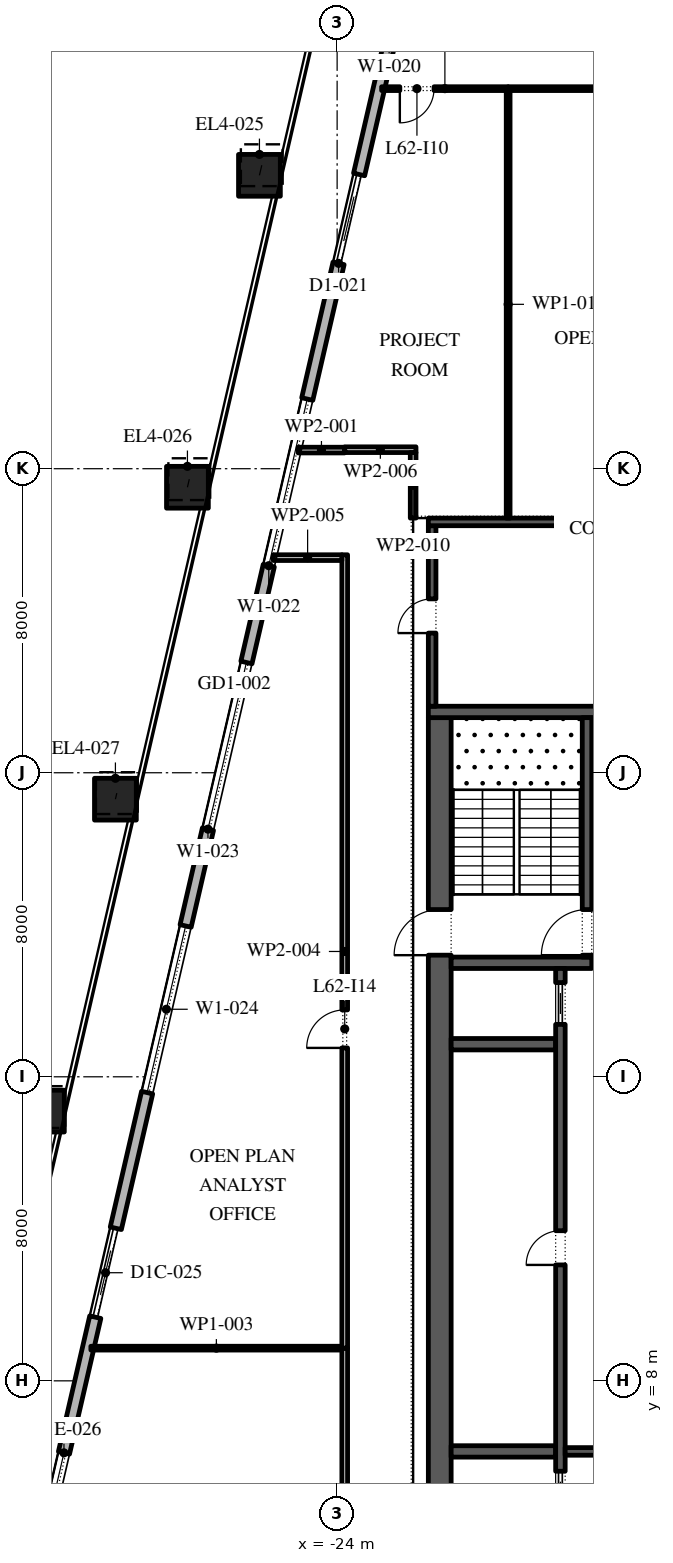
"""IFC4 building model, lengths in metres.
Left out: names, types, materials, properties, quantities, classifications, styles, units other than length and angle.
Written with IfcOpenShell. Run it as: python <this file> out.ifc"""

import sys

from ifc_helpers import new_model, si_unit, direction, frame, frame_2d, origin, origin_2d, place, context, subcontext, project, spatial, rectangle, extrude, element, fill, save


model = new_model("IFC4")
c1 = context("Model", 3, precision=1e-05, world=origin(), true_north=direction((0.0, 1.0)))
c2 = subcontext(c1, "Body", "Model", "MODEL_VIEW")
j1 = project(units=[si_unit("LENGTHUNIT", "METRE"), si_unit("PLANEANGLEUNIT", "RADIAN")], contexts=[c1])
p1 = place(None, origin())
s1 = spatial("IfcSite", under=j1, at=p1, CompositionType="ELEMENT")
p2 = place(p1, origin())
s2 = spatial("IfcBuilding", under=s1, at=p2, CompositionType="ELEMENT")
p3 = place(p2, frame((0.0, 0.0, 285.0)))
s3 = spatial("IfcBuildingStorey", under=s2, at=p3, CompositionType="ELEMENT", Elevation=285.0)
p4 = place(p3, frame((-26.044, 39.719, 0.0), z_axis=(0.014559841898, 0.063111984005, 0.997900239743), x_axis=(-0.97440628778, 0.224794097641, 0.0)))
e1 = element("IfcColumn", 1, at=p4, inside=s3, PredefinedType="COLUMN", context=c2, shape_type="SweptSolid", body=[
    extrude(rectangle(XDim=1.1, YDim=1.1, at=origin_2d()), origin(), (0.0, 0.0, 1.0), 4.209),
])
p5 = place(p3, frame((-27.939, 31.512, 0.0), z_axis=(0.011668267153, 0.050562490995, 0.998652735462), x_axis=(-0.974391195695, 0.224859506699, 0.0)))
e2 = element("IfcColumn", 2, at=p5, inside=s3, PredefinedType="COLUMN", context=c2, shape_type="SweptSolid", body=[
    extrude(rectangle(XDim=1.1, YDim=1.1, at=origin_2d()), origin(), (0.0, 0.0, 1.0), 4.206),
])
p6 = place(p3, frame((-29.834, 23.304, 0.0), z_axis=(0.008770884695, 0.037929719907, 0.99924191662), x_axis=(-0.974290512438, 0.225295355862, 0.0)))
e3 = element("IfcColumn", 3, at=p6, inside=s3, PredefinedType="COLUMN", context=c2, shape_type="SweptSolid", body=[
    extrude(rectangle(XDim=1.1, YDim=1.1, at=origin_2d()), origin(), (0.0, 0.0, 1.0), 4.203),
])
p7 = place(p3, frame((-31.729, 15.097, 0.0), z_axis=(0.005869091843, 0.025277771797, 0.999663237302), x_axis=(-0.974088391429, 0.226167649504, 0.0)))
e4 = element("IfcColumn", 4, at=p7, inside=s3, PredefinedType="COLUMN", context=c2, shape_type="SweptSolid", body=[
    extrude(rectangle(XDim=1.1, YDim=1.1, at=origin_2d()), origin(), (0.0, 0.0, 1.0), 4.201),
])
p8 = place(p3, frame((-21.359, 48.678, 0.0), z_axis=(0.0, 0.0, 1.0), x_axis=(-0.224949198343, -0.974370493275, 0.0)))
e5 = element("IfcWall", 5, at=p8, inside=s3, PredefinedType="STANDARD", context=c2, shape_type="SweptSolid", body=[
    extrude(rectangle(XDim=49.5, YDim=0.3, at=frame_2d((24.75, 0.0))), origin(), (0.0, 0.0, 1.0), 4.0),
])
p9 = place(p8, frame((1.157, 0.0, 0.45)))
e6 = element("IfcOpeningElement", 6, at=p9, cuts=e5, PredefinedType="OPENING", context=c2, shape_type="SweptSolid", body=[
    extrude(rectangle(XDim=4.5, YDim=3.05, at=frame_2d((2.25, 1.525))), frame((0.0, 0.16, 0.0), z_axis=(0.0, -1.0, 0.0), x_axis=(1.0, 0.0, 0.0)), (0.0, 0.0, 1.0), 0.32),
])
p10 = place(p8, frame((9.171, 0.0, 0.0)))
e7 = element("IfcOpeningElement", 7, at=p10, cuts=e5, PredefinedType="OPENING", context=c2, shape_type="SweptSolid", body=[
    extrude(rectangle(XDim=2.4, YDim=3.5, at=frame_2d((1.2, 1.75))), frame((0.0, 0.16, 0.0), z_axis=(0.0, -1.0, 0.0), x_axis=(1.0, 0.0, 0.0)), (0.0, 0.0, 1.0), 0.32),
])
p11 = place(p8, frame((15.236, 0.0, 0.45)))
e8 = element("IfcOpeningElement", 8, at=p11, cuts=e5, PredefinedType="OPENING", context=c2, shape_type="SweptSolid", body=[
    extrude(rectangle(XDim=4.5, YDim=3.05, at=frame_2d((2.25, 1.525))), frame((0.0, 0.16, 0.0), z_axis=(0.0, -1.0, 0.0), x_axis=(1.0, 0.0, 0.0)), (0.0, 0.0, 1.0), 0.32),
])
p12 = place(p8, frame((22.35, 0.0, 0.45)))
e9 = element("IfcOpeningElement", 9, at=p12, cuts=e5, PredefinedType="OPENING", context=c2, shape_type="SweptSolid", body=[
    extrude(rectangle(XDim=4.5, YDim=3.05, at=frame_2d((2.25, 1.525))), frame((0.0, 0.16, 0.0), z_axis=(0.0, -1.0, 0.0), x_axis=(1.0, 0.0, 0.0)), (0.0, 0.0, 1.0), 0.32),
])
p13 = place(p8, frame((29.464, 0.0, 0.45)))
e10 = element("IfcOpeningElement", 10, at=p13, cuts=e5, PredefinedType="OPENING", context=c2, shape_type="SweptSolid", body=[
    extrude(rectangle(XDim=4.5, YDim=3.05, at=frame_2d((2.25, 1.525))), frame((0.0, 0.16, 0.0), z_axis=(0.0, -1.0, 0.0), x_axis=(1.0, 0.0, 0.0)), (0.0, 0.0, 1.0), 0.32),
])
p14 = place(p8, frame((37.628, 0.0, 0.0)))
e11 = element("IfcOpeningElement", 11, at=p14, cuts=e5, PredefinedType="OPENING", context=c2, shape_type="SweptSolid", body=[
    extrude(rectangle(XDim=2.4, YDim=3.325, at=frame_2d((1.2, 1.663))), frame((0.0, 0.16, 0.0), z_axis=(0.0, -1.0, 0.0), x_axis=(1.0, 0.0, 0.0)), (0.0, 0.0, 1.0), 0.32),
])
p15 = place(p8, frame((43.693, 0.0, 0.45)))
e12 = element("IfcOpeningElement", 12, at=p15, cuts=e5, PredefinedType="OPENING", context=c2, shape_type="SweptSolid", body=[
    extrude(rectangle(XDim=4.5, YDim=2.825, at=frame_2d((2.25, 1.413))), frame((0.0, 0.16, 0.0), z_axis=(0.0, -1.0, 0.0), x_axis=(1.0, 0.0, 0.0)), (0.0, 0.0, 1.0), 0.32),
])
p16 = place(p3, frame((-21.3, -2.45, 0.0), z_axis=(0.0, 0.0, 1.0), x_axis=(0.0, 1.0, 0.0)))
e13 = element("IfcWall", 13, at=p16, inside=s3, PredefinedType="SHEAR", context=c2, shape_type="SweptSolid", body=[
    extrude(rectangle(XDim=27.9, YDim=0.6, at=frame_2d((13.95, 0.0))), origin(), (0.0, 0.0, 1.0), 4.0),
])
p17 = place(p16, frame((5.05, 0.0, 0.0)))
e14 = element("IfcOpeningElement", 14, at=p17, cuts=e13, PredefinedType="OPENING", context=c2, shape_type="SweptSolid", body=[
    extrude(rectangle(XDim=1.2, YDim=2.1, at=frame_2d((0.6, 1.05))), frame((0.0, 0.31, 0.0), z_axis=(0.0, -1.0, 0.0), x_axis=(1.0, 0.0, 0.0)), (0.0, 0.0, 1.0), 0.62),
])
p18 = place(p16, frame((21.65, 0.0, 0.0)))
e15 = element("IfcOpeningElement", 15, at=p18, cuts=e13, PredefinedType="OPENING", context=c2, shape_type="SweptSolid", body=[
    extrude(rectangle(XDim=1.2, YDim=2.1, at=frame_2d((0.6, 1.05))), frame((0.0, 0.31, 0.0), z_axis=(0.0, -1.0, 0.0), x_axis=(1.0, 0.0, 0.0)), (0.0, 0.0, 1.0), 0.62),
])
p19 = place(p3, frame((-21.6, 25.6, 0.0), z_axis=(0.0, 0.0, 1.0), x_axis=(1.0, 0.0, 0.0)))
e16 = element("IfcWall", 16, at=p19, inside=s3, PredefinedType="SHEAR", context=c2, shape_type="SweptSolid", body=[
    extrude(rectangle(XDim=11.2, YDim=0.3, at=frame_2d((5.6, 0.0))), origin(), (0.0, 0.0, 1.0), 4.0),
])
p20 = place(p3, frame((-21.0, 19.0, 0.0), z_axis=(0.0, 0.0, 1.0), x_axis=(1.0, 0.0, 0.0)))
e17 = element("IfcWall", 17, at=p20, inside=s3, PredefinedType="SHEAR", context=c2, shape_type="SweptSolid", body=[
    extrude(rectangle(XDim=3.7, YDim=0.3, at=frame_2d((1.85, 0.0))), origin(), (0.0, 0.0, 1.0), 4.0),
])
p21 = place(p3, frame((-17.425, 19.15, 0.0), z_axis=(0.0, 0.0, 1.0), x_axis=(0.0, 1.0, 0.0)))
e18 = element("IfcWall", 18, at=p21, inside=s3, PredefinedType="SHEAR", context=c2, shape_type="SweptSolid", body=[
    extrude(rectangle(XDim=6.3, YDim=0.25, at=frame_2d((3.15, 0.0))), origin(), (0.0, 0.0, 1.0), 4.0),
])
p22 = place(p21, frame((0.05, 0.0, 0.0)))
e19 = element("IfcOpeningElement", 19, at=p22, cuts=e18, PredefinedType="OPENING", context=c2, shape_type="SweptSolid", body=[
    extrude(rectangle(XDim=1.2, YDim=2.1, at=frame_2d((0.6, 1.05))), frame((0.0, 0.135, 0.0), z_axis=(0.0, -1.0, 0.0), x_axis=(1.0, 0.0, 0.0)), (0.0, 0.0, 1.0), 0.27),
])
for number, where, z_axis, x_axis in (
    (20, (-21.0, 6.143, 0.0), (0.0, 0.0, 1.0), (1.0, 0.0, 0.0)),
    (21, (-21.0, 16.857, 0.0), (0.0, 0.0, 1.0), (1.0, 0.0, 0.0)),
):
    element("IfcWall", number, at=place(p3, frame(where, z_axis=z_axis, x_axis=x_axis)), inside=s3, PredefinedType="SHEAR", context=c2, shape_type="SweptSolid", body=[
        extrude(rectangle(XDim=2.75, YDim=0.3, at=frame_2d((1.375, 0.0))), origin(), (0.0, 0.0, 1.0), 4.0),
    ])
p23 = place(p3, frame((-18.125, 4.15, 0.0), z_axis=(0.0, 0.0, 1.0), x_axis=(0.0, 1.0, 0.0)))
e22 = element("IfcWall", 22, at=p23, inside=s3, PredefinedType="SHEAR", context=c2, shape_type="SweptSolid", body=[
    extrude(rectangle(XDim=14.7, YDim=0.25, at=frame_2d((7.35, 0.0))), origin(), (0.0, 0.0, 1.0), 4.0),
])
p24 = place(p23, frame((6.9, 0.0, 0.0)))
e23 = element("IfcOpeningElement", 23, at=p24, cuts=e22, PredefinedType="OPENING", context=c2, shape_type="SweptSolid", body=[
    extrude(rectangle(XDim=0.9, YDim=2.1, at=frame_2d((0.45, 1.05))), frame((0.0, 0.135, 0.0), z_axis=(0.0, -1.0, 0.0), x_axis=(1.0, 0.0, 0.0)), (0.0, 0.0, 1.0), 0.27),
])
p25 = place(p23, frame((0.371, 0.0, 0.0)))
e24 = element("IfcOpeningElement", 24, at=p25, cuts=e22, PredefinedType="OPENING", context=c2, shape_type="SweptSolid", body=[
    extrude(rectangle(XDim=1.1, YDim=2.1, at=frame_2d((0.55, 1.05))), frame((0.0, 0.135, 0.0), z_axis=(0.0, -1.0, 0.0), x_axis=(1.0, 0.0, 0.0)), (0.0, 0.0, 1.0), 0.27),
])
p26 = place(p23, frame((13.229, 0.0, 0.0)))
e25 = element("IfcOpeningElement", 25, at=p26, cuts=e22, PredefinedType="OPENING", context=c2, shape_type="SweptSolid", body=[
    extrude(rectangle(XDim=1.1, YDim=2.1, at=frame_2d((0.55, 1.05))), frame((0.0, 0.135, 0.0), z_axis=(0.0, -1.0, 0.0), x_axis=(1.0, 0.0, 0.0)), (0.0, 0.0, 1.0), 0.27),
])
p27 = place(p3, frame((-18.0, 6.143, 0.0), z_axis=(0.0, 0.0, 1.0), x_axis=(1.0, 0.0, 0.0)))
e26 = element("IfcWall", 26, at=p27, inside=s3, PredefinedType="SHEAR", context=c2, shape_type="SweptSolid", body=[
    extrude(rectangle(XDim=4.0, YDim=0.2, at=frame_2d((2.0, 0.0))), origin(), (0.0, 0.0, 1.0), 4.0),
])
p28 = place(p27, frame((1.4, 0.0, 0.0)))
e27 = element("IfcOpeningElement", 27, at=p28, cuts=e26, PredefinedType="OPENING", context=c2, shape_type="SweptSolid", body=[
    extrude(rectangle(XDim=1.2, YDim=2.1, at=frame_2d((0.6, 1.05))), frame((0.0, 0.11, 0.0), z_axis=(0.0, -1.0, 0.0), x_axis=(1.0, 0.0, 0.0)), (0.0, 0.0, 1.0), 0.22),
])
p29 = place(p3, frame((-21.5, 25.75, 0.0), z_axis=(0.0, 0.0, 1.0), x_axis=(0.0, 1.0, 0.0)))
e28 = element("IfcWall", 28, at=p29, inside=s3, PredefinedType="SHEAR", context=c2, shape_type="SweptSolid", body=[
    extrude(rectangle(XDim=4.75, YDim=0.2, at=frame_2d((2.375, 0.0))), origin(), (0.0, 0.0, 1.0), 4.0),
])
p30 = place(p29, frame((1.925, 0.0, 0.0)))
e29 = element("IfcOpeningElement", 29, at=p30, cuts=e28, PredefinedType="OPENING", context=c2, shape_type="SweptSolid", body=[
    extrude(rectangle(XDim=0.9, YDim=2.1, at=frame_2d((0.45, 1.05))), frame((0.0, 0.11, 0.0), z_axis=(0.0, -1.0, 0.0), x_axis=(1.0, 0.0, 0.0)), (0.0, 0.0, 1.0), 0.22),
])
p31 = place(p3, frame((-21.6, 30.6, 0.0), z_axis=(0.0, 0.0, 1.0), x_axis=(1.0, 0.0, 0.0)))
e30 = element("IfcWall", 30, at=p31, inside=s3, PredefinedType="SHEAR", context=c2, shape_type="SweptSolid", body=[
    extrude(rectangle(XDim=11.2, YDim=0.2, at=frame_2d((5.6, 0.0))), origin(), (0.0, 0.0, 1.0), 4.0),
])
p32 = place(p3, frame((-25.025, 32.49, 0.0), z_axis=(0.0, 0.0, 1.0), x_axis=(1.0, 0.0, 0.0)))
e31 = element("IfcWall", 31, at=p32, inside=s3, PredefinedType="PARTITIONING", context=c2, shape_type="SweptSolid", body=[
    extrude(rectangle(XDim=1.225, YDim=0.15, at=frame_2d((0.612, 0.0))), origin(), (0.0, 0.0, 1.0), 4.0),
])
p33 = place(p3, frame((-23.8, -4.4, 0.0), z_axis=(0.0, 0.0, 1.0), x_axis=(0.0, 1.0, 0.0)))
e32 = element("IfcWall", 32, at=p33, inside=s3, PredefinedType="PARTITIONING", context=c2, shape_type="SweptSolid", body=[
    extrude(rectangle(XDim=13.26, YDim=0.15, at=frame_2d((6.63, 0.0))), origin(), (0.0, 0.0, 1.0), 4.0),
])
p34 = place(p33, frame((7.36, 0.0, 0.0)))
e33 = element("IfcOpeningElement", 33, at=p34, cuts=e32, PredefinedType="OPENING", context=c2, shape_type="SweptSolid", body=[
    extrude(rectangle(XDim=1.0, YDim=2.1, at=frame_2d((0.5, 1.05))), frame((0.0, 0.085, 0.0), z_axis=(0.0, -1.0, 0.0), x_axis=(1.0, 0.0, 0.0)), (0.0, 0.0, 1.0), 0.17),
])
p35 = place(p3, frame((-23.875, 8.86, 0.0), z_axis=(0.0, 0.0, 1.0), x_axis=(-1.0, 0.0, 0.0)))
e34 = element("IfcWall", 34, at=p35, inside=s3, PredefinedType="PARTITIONING", context=c2, shape_type="SweptSolid", body=[
    extrude(rectangle(XDim=6.605, YDim=0.1, at=frame_2d((3.302, 0.0))), origin(), (0.0, 0.0, 1.0), 4.0),
])
p36 = place(p3, frame((-23.8, 8.86, 0.0), z_axis=(0.0, 0.0, 1.0), x_axis=(0.0, 1.0, 0.0)))
e35 = element("IfcWall", 35, at=p36, inside=s3, PredefinedType="PARTITIONING", context=c2, shape_type="SweptSolid", body=[
    extrude(rectangle(XDim=20.875, YDim=0.15, at=frame_2d((10.438, 0.0))), origin(), (0.0, 0.0, 1.0), 4.0),
])
p37 = place(p36, frame((7.9, 0.0, 0.0)))
e36 = element("IfcOpeningElement", 36, at=p37, cuts=e35, PredefinedType="OPENING", context=c2, shape_type="SweptSolid", body=[
    extrude(rectangle(XDim=1.0, YDim=2.1, at=frame_2d((0.5, 1.05))), frame((0.0, 0.085, 0.0), z_axis=(0.0, -1.0, 0.0), x_axis=(1.0, 0.0, 0.0)), (0.0, 0.0, 1.0), 0.17),
])
p38 = place(p3, frame((-23.875, 29.66, 0.0), z_axis=(0.0, 0.0, 1.0), x_axis=(-1.0, 0.0, 0.0)))
e37 = element("IfcWall", 37, at=p38, inside=s3, PredefinedType="PARTITIONING", context=c2, shape_type="SweptSolid", body=[
    extrude(rectangle(XDim=1.803, YDim=0.15, at=frame_2d((0.901, 0.0))), origin(), (0.0, 0.0, 1.0), 4.0),
])
p39 = place(p3, frame((-23.8, 32.5, 0.0), z_axis=(0.0, 0.0, 1.0), x_axis=(1.0, 0.0, 0.0)))
e38 = element("IfcWall", 38, at=p39, inside=s3, PredefinedType="PARTITIONING", context=c2, shape_type="SweptSolid", body=[
    extrude(rectangle(XDim=1.875, YDim=0.15, at=frame_2d((0.938, 0.0))), origin(), (0.0, 0.0, 1.0), 4.0),
])
p40 = place(p3, frame((-22.829, 42.0, 0.0), z_axis=(0.0, 0.0, 1.0), x_axis=(1.0, 0.0, 0.0)))
e39 = element("IfcWall", 39, at=p40, inside=s3, PredefinedType="PARTITIONING", context=c2, shape_type="SweptSolid", body=[
    extrude(rectangle(XDim=3.329, YDim=0.1, at=frame_2d((1.665, 0.0))), origin(), (0.0, 0.0, 1.0), 4.0),
])
p41 = place(p40, frame((0.479, 0.0, 0.0)))
e40 = element("IfcOpeningElement", 40, at=p41, cuts=e39, PredefinedType="OPENING", context=c2, shape_type="SweptSolid", body=[
    extrude(rectangle(XDim=0.9, YDim=2.1, at=frame_2d((0.45, 1.05))), frame((0.0, 0.06, 0.0), z_axis=(0.0, -1.0, 0.0), x_axis=(1.0, 0.0, 0.0)), (0.0, 0.0, 1.0), 0.12),
])
p42 = place(p3, frame((-22.0, 32.425, 0.0), z_axis=(0.0, 0.0, 1.0), x_axis=(0.0, -1.0, 0.0)))
e41 = element("IfcWall", 41, at=p42, inside=s3, PredefinedType="PARTITIONING", context=c2, shape_type="SweptSolid", body=[
    extrude(rectangle(XDim=1.725, YDim=0.15, at=frame_2d((0.863, 0.0))), origin(), (0.0, 0.0, 1.0), 4.0),
])
p43 = place(p3, frame((-19.5, 41.95, 0.0), z_axis=(0.0, 0.0, 1.0), x_axis=(0.0, -1.0, 0.0)))
e42 = element("IfcWall", 42, at=p43, inside=s3, PredefinedType="PARTITIONING", context=c2, shape_type="SweptSolid", body=[
    extrude(rectangle(XDim=11.25, YDim=0.1, at=frame_2d((5.625, 0.0))), origin(), (0.0, 0.0, 1.0), 4.0),
])
p44 = place(p3, frame((-19.5, 42.0, 0.0), z_axis=(0.0, 0.0, 1.0), x_axis=(1.0, 0.0, 0.0)))
e43 = element("IfcWall", 43, at=p44, inside=s3, PredefinedType="PARTITIONING", context=c2, shape_type="SweptSolid", body=[
    extrude(rectangle(XDim=10.21, YDim=0.1, at=frame_2d((5.105, 0.0))), origin(), (0.0, 0.0, 1.0), 4.0),
])
p45 = place(p44, frame((2.7, 0.0, 0.0)))
e44 = element("IfcOpeningElement", 44, at=p45, cuts=e43, PredefinedType="OPENING", context=c2, shape_type="SweptSolid", body=[
    extrude(rectangle(XDim=0.9, YDim=2.1, at=frame_2d((0.45, 1.05))), frame((0.0, 0.06, 0.0), z_axis=(0.0, -1.0, 0.0), x_axis=(1.0, 0.0, 0.0)), (0.0, 0.0, 1.0), 0.12),
])
p46 = place(p10, origin())
e45 = element("IfcDoor", 45, at=p46, inside=s3, OperationType="DOUBLE_DOOR_SLIDING", PredefinedType="DOOR", context=c2, shape_type="SweptSolid", body=[
    extrude(rectangle(XDim=2.4, YDim=3.5, at=frame_2d((1.2, 1.75))), frame((0.0, 0.025, 0.0), z_axis=(0.0, -1.0, 0.0), x_axis=(1.0, 0.0, 0.0)), (0.0, 0.0, 1.0), 0.05),
])
fill(e7, e45)
p47 = place(p11, origin())
e46 = element("IfcWindow", 46, at=p47, inside=s3, PartitioningType="DOUBLE_PANEL_VERTICAL", PredefinedType="WINDOW", context=c2, shape_type="SweptSolid", body=[
    extrude(rectangle(XDim=4.5, YDim=3.05, at=frame_2d((2.25, 1.525))), frame((0.0, 0.03, 0.0), z_axis=(0.0, -1.0, 0.0), x_axis=(1.0, 0.0, 0.0)), (0.0, 0.0, 1.0), 0.06),
])
fill(e8, e46)
p48 = place(p12, origin())
e47 = element("IfcWindow", 47, at=p48, inside=s3, PartitioningType="DOUBLE_PANEL_VERTICAL", PredefinedType="WINDOW", context=c2, shape_type="SweptSolid", body=[
    extrude(rectangle(XDim=4.5, YDim=3.05, at=frame_2d((2.25, 1.525))), frame((0.0, 0.03, 0.0), z_axis=(0.0, -1.0, 0.0), x_axis=(1.0, 0.0, 0.0)), (0.0, 0.0, 1.0), 0.06),
])
fill(e9, e47)
p49 = place(p13, origin())
e48 = element("IfcWindow", 48, at=p49, inside=s3, PartitioningType="DOUBLE_PANEL_VERTICAL", PredefinedType="WINDOW", context=c2, shape_type="SweptSolid", body=[
    extrude(rectangle(XDim=4.5, YDim=3.05, at=frame_2d((2.25, 1.525))), frame((0.0, 0.03, 0.0), z_axis=(0.0, -1.0, 0.0), x_axis=(1.0, 0.0, 0.0)), (0.0, 0.0, 1.0), 0.06),
])
fill(e10, e48)
p50 = place(p14, origin())
e49 = element("IfcDoor", 49, at=p50, inside=s3, OperationType="DOUBLE_DOOR_SLIDING", PredefinedType="DOOR", context=c2, shape_type="SweptSolid", body=[
    extrude(rectangle(XDim=2.4, YDim=3.325, at=frame_2d((1.2, 1.663))), frame((0.0, 0.025, 0.0), z_axis=(0.0, -1.0, 0.0), x_axis=(1.0, 0.0, 0.0)), (0.0, 0.0, 1.0), 0.05),
])
fill(e11, e49)
p51 = place(p15, origin())
e50 = element("IfcWindow", 50, at=p51, inside=s3, PartitioningType="DOUBLE_PANEL_VERTICAL", PredefinedType="WINDOW", context=c2, shape_type="SweptSolid", body=[
    extrude(rectangle(XDim=4.5, YDim=2.825, at=frame_2d((2.25, 1.413))), frame((0.0, 0.03, 0.0), z_axis=(0.0, -1.0, 0.0), x_axis=(1.0, 0.0, 0.0)), (0.0, 0.0, 1.0), 0.06),
])
fill(e12, e50)
p52 = place(p24, origin())
e51 = element("IfcDoor", 51, at=p52, inside=s3, OperationType="SINGLE_SWING_RIGHT", PredefinedType="DOOR", context=c2, shape_type="SweptSolid", body=[
    extrude(rectangle(XDim=0.9, YDim=2.1, at=frame_2d((0.45, 1.05))), frame((0.0, 0.125, 0.0), z_axis=(0.0, -1.0, 0.0), x_axis=(1.0, 0.0, 0.0)), (0.0, 0.0, 1.0), 0.05),
])
fill(e23, e51)
p53 = place(p25, origin())
e52 = element("IfcDoor", 52, at=p53, inside=s3, OperationType="SLIDING_TO_LEFT", PredefinedType="DOOR", context=c2, shape_type="SweptSolid", body=[
    extrude(rectangle(XDim=1.1, YDim=2.1, at=frame_2d((0.55, 1.05))), frame((0.0, 0.025, 0.0), z_axis=(0.0, -1.0, 0.0), x_axis=(1.0, 0.0, 0.0)), (0.0, 0.0, 1.0), 0.05),
])
fill(e24, e52)
p54 = place(p26, origin())
e53 = element("IfcDoor", 53, at=p54, inside=s3, OperationType="SLIDING_TO_LEFT", PredefinedType="DOOR", context=c2, shape_type="SweptSolid", body=[
    extrude(rectangle(XDim=1.1, YDim=2.1, at=frame_2d((0.55, 1.05))), frame((0.0, 0.025, 0.0), z_axis=(0.0, -1.0, 0.0), x_axis=(1.0, 0.0, 0.0)), (0.0, 0.0, 1.0), 0.05),
])
fill(e25, e53)
p55 = place(p22, origin())
e54 = element("IfcDoor", 54, at=p55, inside=s3, OperationType="SINGLE_SWING_RIGHT", PredefinedType="DOOR", context=c2, shape_type="SweptSolid", body=[
    extrude(rectangle(XDim=1.2, YDim=2.1, at=frame_2d((0.6, 1.05))), frame((0.0, 0.025, 0.0), z_axis=(0.0, -1.0, 0.0), x_axis=(1.0, 0.0, 0.0)), (0.0, 0.0, 1.0), 0.05),
])
fill(e19, e54)
p56 = place(p18, origin())
e55 = element("IfcDoor", 55, at=p56, inside=s3, OperationType="SINGLE_SWING_RIGHT", PredefinedType="DOOR", context=c2, shape_type="SweptSolid", body=[
    extrude(rectangle(XDim=1.2, YDim=2.1, at=frame_2d((0.6, 1.05))), frame((0.0, 0.025, 0.0), z_axis=(0.0, -1.0, 0.0), x_axis=(1.0, 0.0, 0.0)), (0.0, 0.0, 1.0), 0.05),
])
fill(e15, e55)
p57 = place(p30, origin())
e56 = element("IfcDoor", 56, at=p57, inside=s3, OperationType="SINGLE_SWING_RIGHT", PredefinedType="DOOR", context=c2, shape_type="SweptSolid", body=[
    extrude(rectangle(XDim=0.9, YDim=2.1, at=frame_2d((0.45, 1.05))), frame((0.0, -0.05, 0.0), z_axis=(0.0, -1.0, 0.0), x_axis=(1.0, 0.0, 0.0)), (0.0, 0.0, 1.0), 0.05),
])
fill(e29, e56)
p58 = place(p41, frame((0.9, 0.0, 0.0), z_axis=(0.0, 0.0, 1.0), x_axis=(-1.0, 0.0, 0.0)))
e57 = element("IfcDoor", 57, at=p58, inside=s3, OperationType="SINGLE_SWING_LEFT", PredefinedType="DOOR", context=c2, shape_type="SweptSolid", body=[
    extrude(rectangle(XDim=0.9, YDim=2.1, at=frame_2d((0.45, 1.05))), frame((0.0, 0.025, 0.0), z_axis=(0.0, -1.0, 0.0), x_axis=(1.0, 0.0, 0.0)), (0.0, 0.0, 1.0), 0.05),
])
fill(e40, e57)
p59 = place(p37, origin())
e58 = element("IfcDoor", 58, at=p59, inside=s3, OperationType="SINGLE_SWING_RIGHT", PredefinedType="DOOR", context=c2, shape_type="SweptSolid", body=[
    extrude(rectangle(XDim=1.0, YDim=2.1, at=frame_2d((0.5, 1.05))), frame((0.0, 0.025, 0.0), z_axis=(0.0, -1.0, 0.0), x_axis=(1.0, 0.0, 0.0)), (0.0, 0.0, 1.0), 0.05),
])
fill(e36, e58)
save(model, sys.argv[1])
